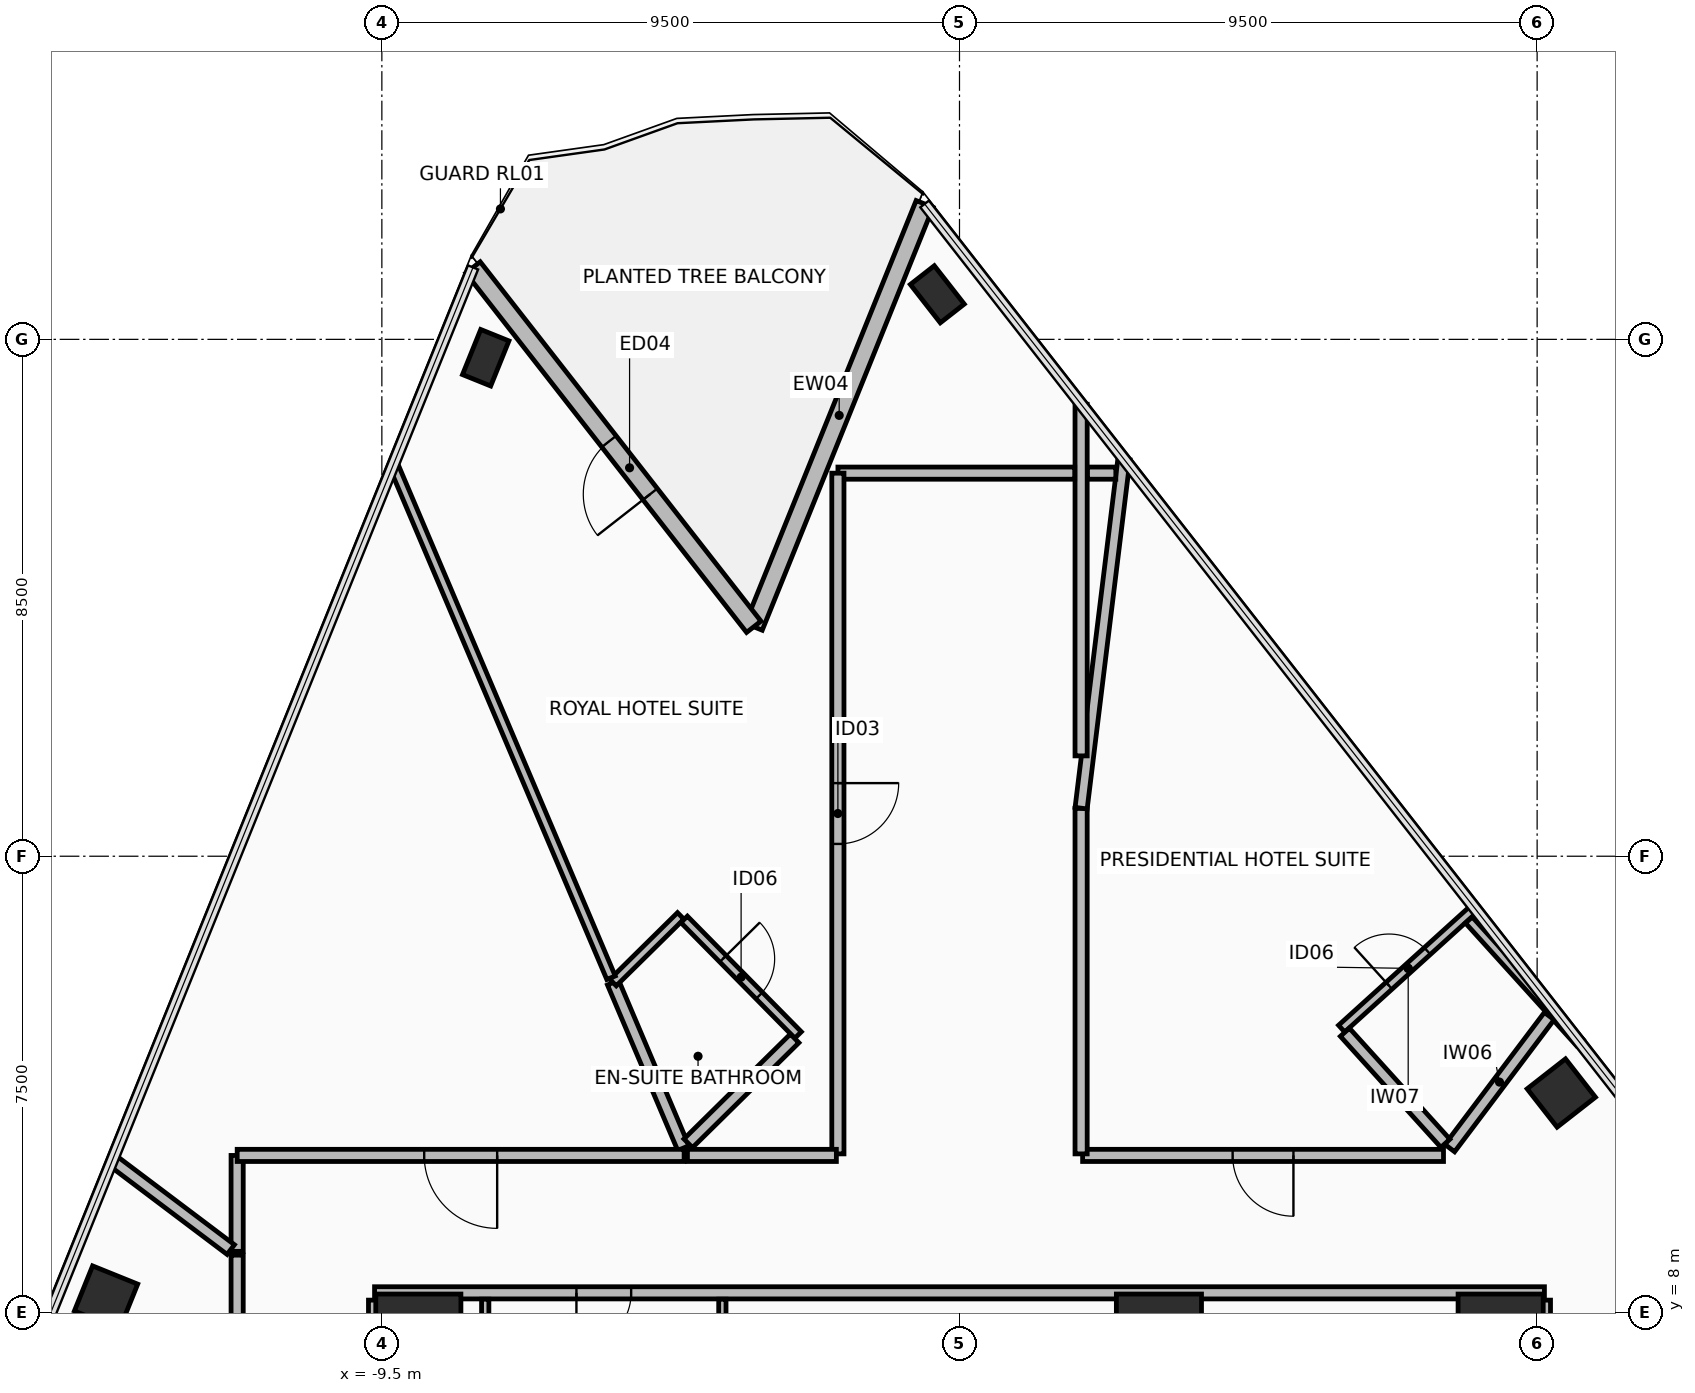
"""IFC4 building model, lengths in metres.
Left out: names, types, materials, properties, quantities, classifications, styles, units other than length and angle.
Written with IfcOpenShell. Run it as: python <this file> out.ifc"""

import sys

from ifc_helpers import new_model, si_unit, direction, frame, frame_2d, origin, origin_2d, place, context, subcontext, project, spatial, rectangle, hollow_rectangle, extrude, element, fill, save


model = new_model("IFC4")
c1 = context("Model", 3, precision=1e-05, world=origin(), true_north=direction((0.0, 1.0)))
c2 = subcontext(c1, "Body", "Model", "MODEL_VIEW")
j1 = project(units=[si_unit("LENGTHUNIT", "METRE"), si_unit("PLANEANGLEUNIT", "RADIAN")], contexts=[c1])
p1 = place(None, origin())
s1 = spatial("IfcSite", under=j1, at=p1, CompositionType="ELEMENT")
p2 = place(p1, origin())
s2 = spatial("IfcBuilding", under=s1, at=p2, CompositionType="ELEMENT")
p3 = place(p2, frame((0.0, 0.0, 74.2)))
s3 = spatial("IfcBuildingStorey", under=s2, at=p3, CompositionType="ELEMENT", Elevation=74.2)
for number, where, z_axis, x_axis in (
    (1, (8.9, 7.6, 0.0), (0.0, 0.0, 1.0), (1.0, 0.0, 0.0)),
    (2, (3.28, 7.6, 0.0), (0.0, 0.0, 1.0), (1.0, 0.0, 0.0)),
    (3, (-8.9, 7.6, 0.0), (0.0, 0.0, 1.0), (1.0, 0.0, 0.0)),
):
    element("IfcColumn", number, at=place(p3, frame(where, z_axis=z_axis, x_axis=x_axis)), inside=s3, PredefinedType="COLUMN", context=c2, shape_type="SweptSolid", body=[
        extrude(rectangle(XDim=1.4, YDim=1.4, at=origin_2d()), origin(), (0.0, 0.0, 1.0), 3.45),
    ])
p4 = place(p3, frame((-7.792, 23.698, 0.0), z_axis=(0.0, 0.0, 1.0), x_axis=(0.374608211656, 0.927183200754, 0.0)))
e4 = element("IfcColumn", 4, at=p4, inside=s3, PredefinedType="COLUMN", context=c2, shape_type="SweptSolid", body=[
    extrude(hollow_rectangle(XDim=0.5, YDim=0.8, WallThickness=0.04, at=origin_2d()), origin(), (0.0, 0.0, 1.0), 3.45),
])
for number, where, z_axis, x_axis in (
    (5, (-14.036, 8.242, 0.0), (0.0, 0.0, 1.0), (0.375, 0.927, 0.0)),
    (6, (9.898, 11.606, 0.0), (0.0, 0.0, 1.0), (-0.616, 0.788, 0.0)),
):
    element("IfcColumn", number, at=place(p3, frame(where, z_axis=z_axis, x_axis=x_axis)), inside=s3, PredefinedType="COLUMN", context=c2, shape_type="SweptSolid", body=[
        extrude(hollow_rectangle(XDim=0.8, YDim=0.8, WallThickness=0.045, at=origin_2d()), origin(), (0.0, 0.0, 1.0), 3.45),
    ])
p5 = place(p3, frame((-0.365, 24.741, 0.0), z_axis=(0.0, 0.0, 1.0), x_axis=(-0.615661475326, 0.788010753607, 0.0)))
e7 = element("IfcColumn", 7, at=p5, inside=s3, PredefinedType="COLUMN", context=c2, shape_type="SweptSolid", body=[
    extrude(hollow_rectangle(XDim=0.5, YDim=0.8, WallThickness=0.04, at=origin_2d()), origin(), (0.0, 0.0, 1.0), 3.45),
])
p6 = place(p3, frame((-0.574, 26.227, 0.0), z_axis=(0.0, 0.0, 1.0), x_axis=(-0.374609979755, -0.92718248639, 0.0)))
e8 = element("IfcWall", 8, at=p6, inside=s3, PredefinedType="STANDARD", context=c2, shape_type="SweptSolid", body=[
    extrude(rectangle(XDim=7.5, YDim=0.3, at=frame_2d((3.75, 0.0))), origin(), (0.0, 0.0, 1.0), 2.47),
])
p7 = place(p3, frame((-3.383, 19.273, 0.0), z_axis=(0.0, 0.0, 1.0), x_axis=(-0.615654149001, 0.788016477504, 0.0)))
e9 = element("IfcWall", 9, at=p7, inside=s3, PredefinedType="STANDARD", context=c2, shape_type="SweptSolid", body=[
    extrude(rectangle(XDim=7.5, YDim=0.3, at=frame_2d((3.75, 0.0))), origin(), (0.0, 0.0, 1.0), 2.47),
])
p8 = place(p7, frame((2.768, 0.0, 0.0)))
e10 = element("IfcOpeningElement", 10, at=p8, cuts=e9, PredefinedType="OPENING", context=c2, shape_type="SweptSolid", body=[
    extrude(rectangle(XDim=1.1, YDim=2.2, at=frame_2d((0.55, 1.1))), frame((0.0, 0.16, 0.0), z_axis=(0.0, -1.0, 0.0), x_axis=(1.0, 0.0, 0.0)), (0.0, 0.0, 1.0), 0.32),
])
p9 = place(p3, frame((9.62, 8.32, 0.0), z_axis=(0.0, 0.0, 1.0), x_axis=(-1.0, 0.0, 0.0)))
e11 = element("IfcWall", 11, at=p9, inside=s3, PredefinedType="PARTITIONING", context=c2, shape_type="SweptSolid", body=[
    extrude(rectangle(XDim=19.24, YDim=0.2, at=frame_2d((9.62, 0.0))), origin(), (0.0, 0.0, 1.0), 2.62),
])
p10 = place(p9, frame((15.02, 0.0, 0.0)))
e12 = element("IfcOpeningElement", 12, at=p10, cuts=e11, PredefinedType="OPENING", context=c2, shape_type="SweptSolid", body=[
    extrude(rectangle(XDim=0.9, YDim=2.1, at=frame_2d((0.45, 1.05))), frame((0.0, 0.11, 0.0), z_axis=(0.0, -1.0, 0.0), x_axis=(1.0, 0.0, 0.0)), (0.0, 0.0, 1.0), 0.22),
])
p11 = place(p3, frame((-9.62, 8.2, 0.0), z_axis=(0.0, 0.0, 1.0), x_axis=(0.0, -1.0, 0.0)))
e13 = element("IfcWall", 13, at=p11, inside=s3, PredefinedType="PARTITIONING", context=c2, shape_type="SweptSolid", body=[
    extrude(rectangle(XDim=16.4, YDim=0.2, at=frame_2d((8.2, 0.0))), origin(), (0.0, 0.0, 1.0), 2.67),
])
p12 = place(p11, frame((12.65, 0.0, 0.0)))
e14 = element("IfcOpeningElement", 14, at=p12, cuts=e13, PredefinedType="OPENING", context=c2, shape_type="SweptSolid", body=[
    extrude(rectangle(XDim=1.1, YDim=2.15, at=frame_2d((0.55, 1.075))), frame((0.0, 0.11, 0.0), z_axis=(0.0, -1.0, 0.0), x_axis=(1.0, 0.0, 0.0)), (0.0, 0.0, 1.0), 0.22),
])
p13 = place(p3, frame((9.62, -8.2, 0.0), z_axis=(0.0, 0.0, 1.0), x_axis=(0.0, 1.0, 0.0)))
e15 = element("IfcWall", 15, at=p13, inside=s3, PredefinedType="PARTITIONING", context=c2, shape_type="SweptSolid", body=[
    extrude(rectangle(XDim=16.4, YDim=0.2, at=frame_2d((8.2, 0.0))), origin(), (0.0, 0.0, 1.0), 2.67),
])
p14 = place(p13, frame((12.65, 0.0, 0.0)))
e16 = element("IfcOpeningElement", 16, at=p14, cuts=e15, PredefinedType="OPENING", context=c2, shape_type="SweptSolid", body=[
    extrude(rectangle(XDim=1.1, YDim=2.15, at=frame_2d((0.55, 1.075))), frame((0.0, 0.11, 0.0), z_axis=(0.0, -1.0, 0.0), x_axis=(1.0, 0.0, 0.0)), (0.0, 0.0, 1.0), 0.22),
])
for number, where, z_axis, x_axis in (
    (17, (-3.9, 4.265, 0.0), (0.0, 0.0, 1.0), (0.0, 1.0, 0.0)),
    (18, (-7.8, 8.215, 0.0), (0.0, 0.0, 1.0), (0.0, -1.0, 0.0)),
):
    element("IfcWall", number, at=place(p3, frame(where, z_axis=z_axis, x_axis=x_axis)), inside=s3, PredefinedType="PARTITIONING", context=c2, shape_type="SweptSolid", body=[
        extrude(rectangle(XDim=3.95, YDim=0.12, at=frame_2d((1.975, 0.0))), origin(), (0.0, 0.0, 1.0), 2.47),
    ])
p15 = place(p3, frame((6.285, 12.665, 0.0), z_axis=(0.0, 0.0, 1.0), x_axis=(0.741449590734, 0.671008572524, 0.0)))
e19 = element("IfcWall", 19, at=p15, inside=s3, PredefinedType="PARTITIONING", context=c2, shape_type="SweptSolid", body=[
    extrude(rectangle(XDim=2.953, YDim=0.15, at=frame_2d((1.477, 0.0))), origin(), (0.0, 0.0, 1.0), 2.47),
])
p16 = place(p15, frame((1.052, 0.0, 0.0)))
e20 = element("IfcOpeningElement", 20, at=p16, cuts=e19, PredefinedType="OPENING", context=c2, shape_type="SweptSolid", body=[
    extrude(rectangle(XDim=0.85, YDim=2.1, at=frame_2d((0.425, 1.05))), frame((0.0, 0.085, 0.0), z_axis=(0.0, -1.0, 0.0), x_axis=(1.0, 0.0, 0.0)), (0.0, 0.0, 1.0), 0.17),
])
p17 = place(p3, frame((8.377, 14.451, 0.0), z_axis=(0.0, 0.0, 1.0), x_axis=(0.671106200025, -0.741361226588, 0.0)))
e21 = element("IfcWall", 21, at=p17, inside=s3, PredefinedType="PARTITIONING", context=c2, shape_type="SweptSolid", body=[
    extrude(rectangle(XDim=2.718, YDim=0.15, at=frame_2d((1.359, 0.0))), origin(), (0.0, 0.0, 1.0), 3.275),
])
p18 = place(p3, frame((9.699, 12.871, 0.0), z_axis=(0.0, 0.0, 1.0), x_axis=(-0.601851899486, -0.798607720401, 0.0)))
e22 = element("IfcWall", 22, at=p18, inside=s3, PredefinedType="PARTITIONING", context=c2, shape_type="SweptSolid", body=[
    extrude(rectangle(XDim=2.719, YDim=0.2, at=frame_2d((1.359, 0.0))), origin(), (0.0, 0.0, 1.0), 2.47),
])
p19 = place(p3, frame((7.991, 10.779, 0.0), z_axis=(0.0, 0.0, 1.0), x_axis=(-0.671043084401, 0.741418356178, 0.0)))
e23 = element("IfcWall", 23, at=p19, inside=s3, PredefinedType="PARTITIONING", context=c2, shape_type="SweptSolid", body=[
    extrude(rectangle(XDim=2.463, YDim=0.2, at=frame_2d((1.231, 0.0))), origin(), (0.0, 0.0, 1.0), 2.87),
])
p20 = place(p3, frame((-4.542, 10.7, 0.0), z_axis=(0.0, 0.0, 1.0), x_axis=(-0.390708837986, 0.920514314891, 0.0)))
e24 = element("IfcWall", 24, at=p20, inside=s3, PredefinedType="PARTITIONING", context=c2, shape_type="SweptSolid", body=[
    extrude(rectangle(XDim=2.958, YDim=0.2, at=frame_2d((1.479, 0.0))), origin(), (0.0, 0.0, 1.0), 3.275),
])
p21 = place(p3, frame((-5.698, 13.422, 0.0), z_axis=(0.0, 0.0, 1.0), x_axis=(0.712245773313, 0.701930166326, 0.0)))
e25 = element("IfcWall", 25, at=p21, inside=s3, PredefinedType="PARTITIONING", context=c2, shape_type="SweptSolid", body=[
    extrude(rectangle(XDim=1.562, YDim=0.15, at=frame_2d((0.781, 0.0))), origin(), (0.0, 0.0, 1.0), 3.275),
])
p22 = place(p3, frame((-4.529, 14.462, 0.0), z_axis=(0.0, 0.0, 1.0), x_axis=(0.701967725966, -0.712208755705, 0.0)))
e26 = element("IfcWall", 26, at=p22, inside=s3, PredefinedType="PARTITIONING", context=c2, shape_type="SweptSolid", body=[
    extrude(rectangle(XDim=2.67, YDim=0.15, at=frame_2d((1.335, 0.0))), origin(), (0.0, 0.0, 1.0), 3.275),
])
p23 = place(p22, frame((0.91, 0.0, 0.0)))
e27 = element("IfcOpeningElement", 27, at=p23, cuts=e26, PredefinedType="OPENING", context=c2, shape_type="SweptSolid", body=[
    extrude(rectangle(XDim=0.85, YDim=2.1, at=frame_2d((0.425, 1.05))), frame((0.0, 0.085, 0.0), z_axis=(0.0, -1.0, 0.0), x_axis=(1.0, 0.0, 0.0)), (0.0, 0.0, 1.0), 0.17),
])
p24 = place(p3, frame((-2.711, 12.504, 0.0), z_axis=(0.0, 0.0, 1.0), x_axis=(-0.712254930427, -0.701920874517, 0.0)))
e28 = element("IfcWall", 28, at=p24, inside=s3, PredefinedType="PARTITIONING", context=c2, shape_type="SweptSolid", body=[
    extrude(rectangle(XDim=2.457, YDim=0.2, at=frame_2d((1.229, 0.0))), origin(), (0.0, 0.0, 1.0), 3.275),
])
p25 = place(p3, frame((7.96, 10.58, 0.0), z_axis=(0.0, 0.0, 1.0), x_axis=(-1.0, 0.0, 0.0)))
e29 = element("IfcWall", 29, at=p25, inside=s3, PredefinedType="PARTITIONING", context=c2, shape_type="SweptSolid", body=[
    extrude(rectangle(XDim=5.935, YDim=0.2, at=frame_2d((2.968, 0.0))), origin(), (0.0, 0.0, 1.0), 2.67),
])
p26 = place(p25, frame((2.468, 0.0, 0.0)))
e30 = element("IfcOpeningElement", 30, at=p26, cuts=e29, PredefinedType="OPENING", context=c2, shape_type="SweptSolid", body=[
    extrude(rectangle(XDim=1.0, YDim=2.15, at=frame_2d((0.5, 1.075))), frame((0.0, 0.11, 0.0), z_axis=(0.0, -1.0, 0.0), x_axis=(1.0, 0.0, 0.0)), (0.0, 0.0, 1.0), 0.22),
])
p27 = place(p3, frame((2.0, 10.605, 0.0), z_axis=(0.0, 0.0, 1.0), x_axis=(0.0, 1.0, 0.0)))
e31 = element("IfcWall", 31, at=p27, inside=s3, PredefinedType="PARTITIONING", context=c2, shape_type="SweptSolid", body=[
    extrude(rectangle(XDim=5.682, YDim=0.2, at=frame_2d((2.841, 0.0))), origin(), (0.0, 0.0, 1.0), 2.67),
])
p28 = place(p3, frame((2.0, 16.29, 0.0), z_axis=(0.0, 0.0, 1.0), x_axis=(0.121873061491, 0.992545695111, 0.0)))
e32 = element("IfcWall", 32, at=p28, inside=s3, PredefinedType="PARTITIONING", context=c2, shape_type="SweptSolid", body=[
    extrude(rectangle(XDim=5.783, YDim=0.2, at=frame_2d((2.892, 0.0))), origin(), (0.0, 0.0, 1.0), 2.47),
])
p29 = place(p3, frame((2.0, 17.15, 0.0), z_axis=(0.0, 0.0, 1.0), x_axis=(0.0, 1.0, 0.0)))
e33 = element("IfcWall", 33, at=p29, inside=s3, PredefinedType="PARTITIONING", context=c2, shape_type="SweptSolid", body=[
    extrude(rectangle(XDim=5.782, YDim=0.2, at=frame_2d((2.891, 0.0))), origin(), (0.0, 0.0, 1.0), 2.47),
])
p30 = place(p3, frame((2.571, 21.8, 0.0), z_axis=(0.0, 0.0, 1.0), x_axis=(-1.0, 0.0, 0.0)))
e34 = element("IfcWall", 34, at=p30, inside=s3, PredefinedType="PARTITIONING", context=c2, shape_type="SweptSolid", body=[
    extrude(rectangle(XDim=0.466, YDim=0.2, at=frame_2d((0.233, 0.0))), origin(), (0.0, 0.0, 1.0), 2.47),
])
p31 = place(p3, frame((1.895, 21.8, 0.0), z_axis=(0.0, 0.0, 1.0), x_axis=(-1.0, 0.0, 0.0)))
e35 = element("IfcWall", 35, at=p31, inside=s3, PredefinedType="PARTITIONING", context=c2, shape_type="SweptSolid", body=[
    extrude(rectangle(XDim=3.895, YDim=0.2, at=frame_2d((1.947, 0.0))), origin(), (0.0, 0.0, 1.0), 2.47),
])
p32 = place(p3, frame((-2.0, 21.799, 0.0), z_axis=(0.0, 0.0, 1.0), x_axis=(0.0, -1.0, 0.0)))
e36 = element("IfcWall", 36, at=p32, inside=s3, PredefinedType="PARTITIONING", context=c2, shape_type="SweptSolid", body=[
    extrude(rectangle(XDim=11.194, YDim=0.2, at=frame_2d((5.597, 0.0))), origin(), (0.0, 0.0, 1.0), 3.275),
])
p33 = place(p32, frame((5.097, 0.0, 0.0)))
e37 = element("IfcOpeningElement", 37, at=p33, cuts=e36, PredefinedType="OPENING", context=c2, shape_type="SweptSolid", body=[
    extrude(rectangle(XDim=1.0, YDim=2.15, at=frame_2d((0.5, 1.075))), frame((0.0, 0.11, 0.0), z_axis=(0.0, -1.0, 0.0), x_axis=(1.0, 0.0, 0.0)), (0.0, 0.0, 1.0), 0.22),
])
p34 = place(p3, frame((-2.025, 10.58, 0.0), z_axis=(0.0, 0.0, 1.0), x_axis=(-1.0, 0.0, 0.0)))
e38 = element("IfcWall", 38, at=p34, inside=s3, PredefinedType="PARTITIONING", context=c2, shape_type="SweptSolid", body=[
    extrude(rectangle(XDim=2.449, YDim=0.2, at=frame_2d((1.225, 0.0))), origin(), (0.0, 0.0, 1.0), 3.275),
])
p35 = place(p3, frame((-5.731, 13.501, 0.0), z_axis=(0.0, 0.0, 1.0), x_axis=(-0.390736816807, 0.920502438884, 0.0)))
e39 = element("IfcWall", 39, at=p35, inside=s3, PredefinedType="PARTITIONING", context=c2, shape_type="SweptSolid", body=[
    extrude(rectangle(XDim=9.154, YDim=0.15, at=frame_2d((4.577, 0.0))), origin(), (0.0, 0.0, 1.0), 2.47),
])
p36 = place(p3, frame((-11.88, 10.579, 0.0), z_axis=(0.0, 0.0, 1.0), x_axis=(0.0, -1.0, 0.0)))
e40 = element("IfcWall", 40, at=p36, inside=s3, PredefinedType="PARTITIONING", context=c2, shape_type="SweptSolid", body=[
    extrude(rectangle(XDim=1.577, YDim=0.2, at=frame_2d((0.789, 0.0))), origin(), (0.0, 0.0, 1.0), 3.275),
])
p37 = place(p3, frame((-11.985, 9.031, 0.0), z_axis=(0.0, 0.0, 1.0), x_axis=(-0.798678535853, 0.601757921733, 0.0)))
e41 = element("IfcWall", 41, at=p37, inside=s3, PredefinedType="PARTITIONING", context=c2, shape_type="SweptSolid", body=[
    extrude(rectangle(XDim=2.42, YDim=0.2, at=frame_2d((1.21, 0.0))), origin(), (0.0, 0.0, 1.0), 2.47),
])
p38 = place(p3, frame((-4.529, 10.58, 0.0), z_axis=(0.0, 0.0, 1.0), x_axis=(-1.0, 0.0, 0.0)))
e42 = element("IfcWall", 42, at=p38, inside=s3, PredefinedType="PARTITIONING", context=c2, shape_type="SweptSolid", body=[
    extrude(rectangle(XDim=7.351, YDim=0.2, at=frame_2d((3.675, 0.0))), origin(), (0.0, 0.0, 1.0), 2.62),
])
p39 = place(p38, frame((3.075, 0.0, 0.0)))
e43 = element("IfcOpeningElement", 43, at=p39, cuts=e42, PredefinedType="OPENING", context=c2, shape_type="SweptSolid", body=[
    extrude(rectangle(XDim=1.2, YDim=2.15, at=frame_2d((0.6, 1.075))), frame((0.0, 0.11, 0.0), z_axis=(0.0, -1.0, 0.0), x_axis=(1.0, 0.0, 0.0)), (0.0, 0.0, 1.0), 0.22),
])
p40 = place(p3, frame((-11.88, 8.94, 0.0), z_axis=(0.0, 0.0, 1.0), x_axis=(0.0, -1.0, 0.0)))
e44 = element("IfcWall", 44, at=p40, inside=s3, PredefinedType="PARTITIONING", context=c2, shape_type="SweptSolid", body=[
    extrude(rectangle(XDim=7.015, YDim=0.2, at=frame_2d((3.507, 0.0))), origin(), (0.0, 0.0, 1.0), 2.67),
])
p41 = place(p40, frame((3.057, 0.0, 0.0)))
e45 = element("IfcOpeningElement", 45, at=p41, cuts=e44, PredefinedType="OPENING", context=c2, shape_type="SweptSolid", body=[
    extrude(rectangle(XDim=0.9, YDim=2.1, at=frame_2d((0.45, 1.05))), frame((0.0, 0.11, 0.0), z_axis=(0.0, -1.0, 0.0), x_axis=(1.0, 0.0, 0.0)), (0.0, 0.0, 1.0), 0.22),
])
p42 = place(p8, origin())
e46 = element("IfcDoor", 46, at=p42, inside=s3, OperationType="SINGLE_SWING_LEFT", PredefinedType="DOOR", context=c2, shape_type="SweptSolid", body=[
    extrude(rectangle(XDim=1.1, YDim=2.2, at=frame_2d((0.55, 1.1))), frame((0.0, 0.025, 0.0), z_axis=(0.0, -1.0, 0.0), x_axis=(1.0, 0.0, 0.0)), (0.0, 0.0, 1.0), 0.05),
])
fill(e10, e46)
p43 = place(p10, frame((0.9, 0.0, 0.0), z_axis=(0.0, 0.0, 1.0), x_axis=(-1.0, 0.0, 0.0)))
e47 = element("IfcDoor", 47, at=p43, inside=s3, OperationType="SINGLE_SWING_LEFT", PredefinedType="DOOR", context=c2, shape_type="SweptSolid", body=[
    extrude(rectangle(XDim=0.9, YDim=2.1, at=frame_2d((0.45, 1.05))), frame((0.0, 0.025, 0.0), z_axis=(0.0, -1.0, 0.0), x_axis=(1.0, 0.0, 0.0)), (0.0, 0.0, 1.0), 0.05),
])
fill(e12, e47)
p44 = place(p16, origin())
e48 = element("IfcDoor", 48, at=p44, inside=s3, OperationType="SINGLE_SWING_RIGHT", PredefinedType="DOOR", context=c2, shape_type="SweptSolid", body=[
    extrude(rectangle(XDim=0.85, YDim=2.1, at=frame_2d((0.425, 1.05))), frame((0.0, 0.025, 0.0), z_axis=(0.0, -1.0, 0.0), x_axis=(1.0, 0.0, 0.0)), (0.0, 0.0, 1.0), 0.05),
])
fill(e20, e48)
p45 = place(p23, origin())
e49 = element("IfcDoor", 49, at=p45, inside=s3, OperationType="SINGLE_SWING_RIGHT", PredefinedType="DOOR", context=c2, shape_type="SweptSolid", body=[
    extrude(rectangle(XDim=0.85, YDim=2.1, at=frame_2d((0.425, 1.05))), frame((0.0, 0.025, 0.0), z_axis=(0.0, -1.0, 0.0), x_axis=(1.0, 0.0, 0.0)), (0.0, 0.0, 1.0), 0.05),
])
fill(e27, e49)
p46 = place(p26, origin())
e50 = element("IfcDoor", 50, at=p46, inside=s3, OperationType="SINGLE_SWING_LEFT", PredefinedType="DOOR", context=c2, shape_type="SweptSolid", body=[
    extrude(rectangle(XDim=1.0, YDim=2.15, at=frame_2d((0.5, 1.075))), frame((0.0, 0.025, 0.0), z_axis=(0.0, -1.0, 0.0), x_axis=(1.0, 0.0, 0.0)), (0.0, 0.0, 1.0), 0.05),
])
fill(e30, e50)
p47 = place(p33, origin())
e51 = element("IfcDoor", 51, at=p47, inside=s3, OperationType="SINGLE_SWING_LEFT", PredefinedType="DOOR", context=c2, shape_type="SweptSolid", body=[
    extrude(rectangle(XDim=1.0, YDim=2.15, at=frame_2d((0.5, 1.075))), frame((0.0, 0.025, 0.0), z_axis=(0.0, -1.0, 0.0), x_axis=(1.0, 0.0, 0.0)), (0.0, 0.0, 1.0), 0.05),
])
fill(e37, e51)
p48 = place(p39, origin())
e52 = element("IfcDoor", 52, at=p48, inside=s3, OperationType="SINGLE_SWING_LEFT", PredefinedType="DOOR", context=c2, shape_type="SweptSolid", body=[
    extrude(rectangle(XDim=1.2, YDim=2.15, at=frame_2d((0.6, 1.075))), frame((0.0, 0.025, 0.0), z_axis=(0.0, -1.0, 0.0), x_axis=(1.0, 0.0, 0.0)), (0.0, 0.0, 1.0), 0.05),
])
fill(e43, e52)
save(model, sys.argv[1])
